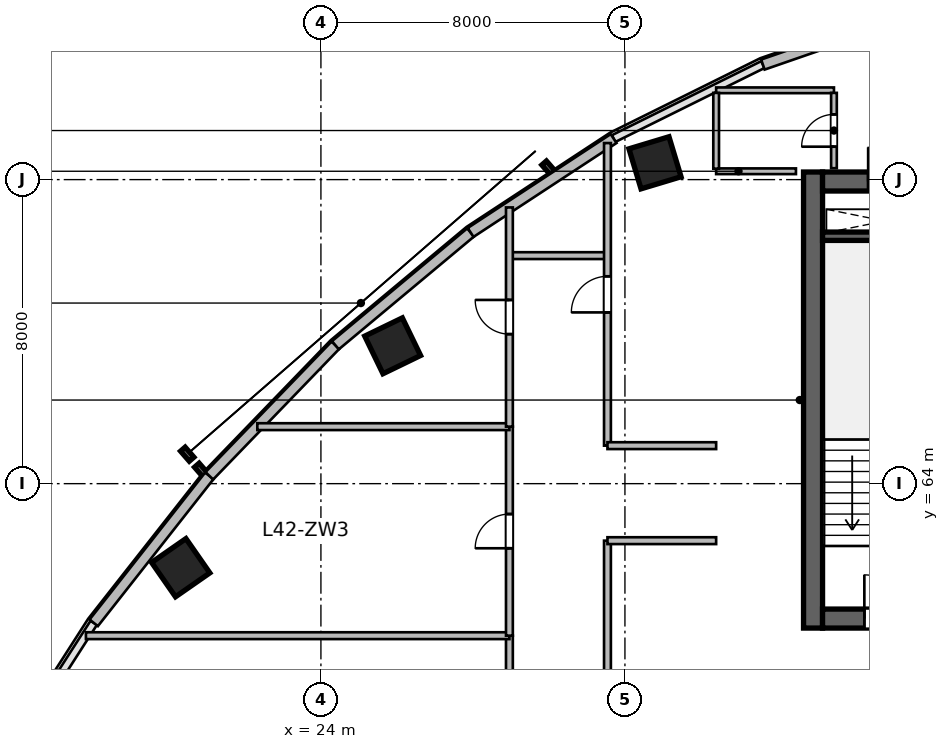
"""IFC4 building model, lengths in metres.
Left out: names, types, materials, properties, quantities, classifications, styles, units other than length and angle.
Written with IfcOpenShell. Run it as: python <this file> out.ifc"""

import sys

from ifc_helpers import new_model, si_unit, direction, frame, frame_2d, origin, origin_2d, place, context, subcontext, project, spatial, rectangle, extrude, source, transform, mapped, element, fill, save


model = new_model("IFC4")
c1 = context("Model", 3, precision=1e-05, world=origin(), true_north=direction((0.0, 1.0)))
c2 = subcontext(c1, "Body", "Model", "MODEL_VIEW")
j1 = project(units=[si_unit("LENGTHUNIT", "METRE"), si_unit("PLANEANGLEUNIT", "RADIAN")], contexts=[c1])
p1 = place(None, origin())
s1 = spatial("IfcSite", under=j1, at=p1, CompositionType="ELEMENT")
p2 = place(p1, origin())
s2 = spatial("IfcBuilding", under=s1, at=p2, CompositionType="ELEMENT")
p3 = place(p2, frame((0.0, 0.0, 174.0)))
s3 = spatial("IfcBuildingStorey", under=s2, at=p3, CompositionType="ELEMENT", Elevation=174.0)
m1 = source(origin(), c2, "Body", "SweptSolid", [
    extrude(rectangle(XDim=12.0, YDim=0.5, at=frame_2d((6.0, 0.0))), origin(), (0.0, 0.0, 1.0), 3.9),
])
p4 = place(p3, frame((36.95, 60.2, 0.0), z_axis=(0.0, 0.0, 1.0), x_axis=(0.0, 1.0, 0.0)))
e1 = element("IfcWall", 1, at=p4, inside=s3, PredefinedType="SHEAR", context=c2, shape_type="MappedRepresentation", body=[
    mapped(m1, transform((0.0, 0.0, 0.0), scale=1.0)),
])
m2 = source(origin(), c2, "Body", "SweptSolid", [
    extrude(rectangle(XDim=21.6, YDim=0.5, at=frame_2d((10.8, 0.0))), origin(), (0.0, 0.0, 1.0), 3.9),
])
p5 = place(p3, frame((37.2, 60.45, 0.0), z_axis=(0.0, 0.0, 1.0), x_axis=(1.0, 0.0, 0.0)))
e2 = element("IfcWall", 2, at=p5, inside=s3, PredefinedType="SHEAR", context=c2, shape_type="MappedRepresentation", body=[
    mapped(m2, transform((0.0, 0.0, 0.0), scale=1.0)),
])
p6 = place(p5, frame((1.1, 0.0, 0.0)))
e3 = element("IfcOpeningElement", 3, at=p6, cuts=e2, PredefinedType="OPENING", context=c2, shape_type="SweptSolid", body=[
    extrude(rectangle(XDim=1.15, YDim=2.15, at=frame_2d((0.575, 1.075))), frame((0.0, 0.26, 0.0), z_axis=(0.0, -1.0, 0.0), x_axis=(1.0, 0.0, 0.0)), (0.0, 0.0, 1.0), 0.52),
])
p7 = place(p5, frame((19.5, 0.0, 0.0)))
e4 = element("IfcOpeningElement", 4, at=p7, cuts=e2, PredefinedType="OPENING", context=c2, shape_type="SweptSolid", body=[
    extrude(rectangle(XDim=0.9, YDim=2.1, at=frame_2d((0.45, 1.05))), frame((0.0, 0.26, 0.0), z_axis=(0.0, -1.0, 0.0), x_axis=(1.0, 0.0, 0.0)), (0.0, 0.0, 1.0), 0.52),
])
p8 = place(p5, frame((12.02, 0.0, 0.0)))
e5 = element("IfcOpeningElement", 5, at=p8, cuts=e2, PredefinedType="OPENING", context=c2, shape_type="SweptSolid", body=[
    extrude(rectangle(XDim=1.6, YDim=2.15, at=frame_2d((0.8, 1.075))), frame((0.0, 0.26, 0.0), z_axis=(0.0, -1.0, 0.0), x_axis=(1.0, 0.0, 0.0)), (0.0, 0.0, 1.0), 0.52),
])
p9 = place(p3, frame((37.2, 71.95, 0.0), z_axis=(0.0, 0.0, 1.0), x_axis=(1.0, 0.0, 0.0)))
e6 = element("IfcWall", 6, at=p9, inside=s3, PredefinedType="SHEAR", context=c2, shape_type="MappedRepresentation", body=[
    mapped(m2, transform((0.0, 0.0, 0.0), scale=1.0)),
])
p10 = place(p9, frame((1.2, 0.0, 0.0)))
e7 = element("IfcOpeningElement", 7, at=p10, cuts=e6, PredefinedType="OPENING", context=c2, shape_type="SweptSolid", body=[
    extrude(rectangle(XDim=0.9, YDim=2.1, at=frame_2d((0.45, 1.05))), frame((0.0, 0.26, 0.0), z_axis=(0.0, -1.0, 0.0), x_axis=(1.0, 0.0, 0.0)), (0.0, 0.0, 1.0), 0.52),
])
p11 = place(p9, frame((14.7, 0.0, 0.0)))
e8 = element("IfcOpeningElement", 8, at=p11, cuts=e6, PredefinedType="OPENING", context=c2, shape_type="SweptSolid", body=[
    extrude(rectangle(XDim=1.2, YDim=2.15, at=frame_2d((0.6, 1.075))), frame((0.0, 0.26, 0.0), z_axis=(0.0, -1.0, 0.0), x_axis=(1.0, 0.0, 0.0)), (0.0, 0.0, 1.0), 0.52),
])
p12 = place(p9, frame((4.15, 0.0, 0.0)))
e9 = element("IfcOpeningElement", 9, at=p12, cuts=e6, PredefinedType="OPENING", context=c2, shape_type="SweptSolid", body=[
    extrude(rectangle(XDim=1.3, YDim=2.15, at=frame_2d((0.65, 1.075))), frame((0.0, 0.26, 0.0), z_axis=(0.0, -1.0, 0.0), x_axis=(1.0, 0.0, 0.0)), (0.0, 0.0, 1.0), 0.52),
])
p13 = place(p9, frame((6.76, 0.0, 0.0)))
e10 = element("IfcOpeningElement", 10, at=p13, cuts=e6, PredefinedType="OPENING", context=c2, shape_type="SweptSolid", body=[
    extrude(rectangle(XDim=0.85, YDim=2.1, at=frame_2d((0.425, 1.05))), frame((0.0, 0.26, 0.0), z_axis=(0.0, -1.0, 0.0), x_axis=(1.0, 0.0, 0.0)), (0.0, 0.0, 1.0), 0.52),
])
p14 = place(p9, frame((8.76, 0.0, 0.0)))
e11 = element("IfcOpeningElement", 11, at=p14, cuts=e6, PredefinedType="OPENING", context=c2, shape_type="SweptSolid", body=[
    extrude(rectangle(XDim=0.85, YDim=2.1, at=frame_2d((0.425, 1.05))), frame((0.0, 0.26, 0.0), z_axis=(0.0, -1.0, 0.0), x_axis=(1.0, 0.0, 0.0)), (0.0, 0.0, 1.0), 0.52),
])
p15 = place(p9, frame((10.725, 0.0, 0.0)))
e12 = element("IfcOpeningElement", 12, at=p15, cuts=e6, PredefinedType="OPENING", context=c2, shape_type="SweptSolid", body=[
    extrude(rectangle(XDim=0.85, YDim=2.1, at=frame_2d((0.425, 1.05))), frame((0.0, 0.26, 0.0), z_axis=(0.0, -1.0, 0.0), x_axis=(1.0, 0.0, 0.0)), (0.0, 0.0, 1.0), 0.52),
])
m3 = source(origin(), c2, "Body", "SweptSolid", [
    extrude(rectangle(XDim=3.27, YDim=0.22, at=frame_2d((1.635, 0.0))), origin(), (0.0, 0.0, 1.0), 3.9),
])
p16 = place(p3, frame((37.2, 70.51, 0.0), z_axis=(0.0, 0.0, 1.0), x_axis=(1.0, 0.0, 0.0)))
e13 = element("IfcWall", 13, at=p16, inside=s3, PredefinedType="SHEAR", context=c2, shape_type="MappedRepresentation", body=[
    mapped(m3, transform((0.0, 0.0, 0.0), scale=1.0)),
])
m4 = source(origin(), c2, "Body", "SweptSolid", [
    extrude(rectangle(XDim=1.1, YDim=1.1, at=origin_2d()), origin(), (0.0, 0.0, 1.0), 3.9),
])
for number, where, z_axis, x_axis in (
    (14, (20.311, 61.789, 0.0), (0.0, 0.0, 1.0), (-0.571, 0.821, 0.0)),
    (15, (25.888, 67.627, 0.0), (0.0, 0.0, 1.0), (-0.436, 0.9, 0.0)),
    (16, (32.791, 72.442, 0.0), (0.0, 0.0, 1.0), (-0.289, 0.957, 0.0)),
):
    element("IfcColumn", number, at=place(p3, frame(where, z_axis=z_axis, x_axis=x_axis)), inside=s3, PredefinedType="COLUMN", context=c2, shape_type="MappedRepresentation", body=[
        mapped(m4, transform((0.0, 0.0, 0.0), scale=1.0)),
    ])
m5 = source(origin(), c2, "Body", "SweptSolid", [
    extrude(rectangle(XDim=4.922, YDim=0.28, at=frame_2d((2.461, 0.0))), origin(), (0.0, 0.0, 1.0), 3.65),
])
p17 = place(p3, frame((18.021, 60.338, 0.0), z_axis=(0.0, 0.0, 1.0), x_axis=(0.61817639101, 0.786039407153, 0.0)))
e17 = element("IfcWall", 17, at=p17, inside=s3, PredefinedType="SOLIDWALL", context=c2, shape_type="MappedRepresentation", body=[
    mapped(m5, transform((0.0, 0.0, 0.0), scale=1.0)),
])
m6 = source(origin(), c2, "Body", "SweptSolid", [
    extrude(rectangle(XDim=4.776, YDim=0.28, at=frame_2d((2.388, 0.0))), origin(), (0.0, 0.0, 1.0), 3.65),
])
p18 = place(p3, frame((21.064, 64.206, 0.0), z_axis=(0.0, 0.0, 1.0), x_axis=(0.694601811851, 0.719394414055, 0.0)))
e18 = element("IfcWall", 18, at=p18, inside=s3, PredefinedType="SOLIDWALL", context=c2, shape_type="MappedRepresentation", body=[
    mapped(m6, transform((0.0, 0.0, 0.0), scale=1.0)),
])
m7 = source(origin(), c2, "Body", "SweptSolid", [
    extrude(rectangle(XDim=4.634, YDim=0.28, at=frame_2d((2.317, 0.0))), origin(), (0.0, 0.0, 1.0), 3.65),
])
p19 = place(p3, frame((24.381, 67.642, 0.0), z_axis=(0.0, 0.0, 1.0), x_axis=(0.767910229096, 0.640557475993, 0.0)))
e19 = element("IfcWall", 19, at=p19, inside=s3, PredefinedType="SOLIDWALL", context=c2, shape_type="MappedRepresentation", body=[
    mapped(m7, transform((0.0, 0.0, 0.0), scale=1.0)),
])
m8 = source(origin(), c2, "Body", "SweptSolid", [
    extrude(rectangle(XDim=4.501, YDim=0.28, at=frame_2d((2.25, 0.0))), origin(), (0.0, 0.0, 1.0), 3.65),
])
p20 = place(p3, frame((27.939, 70.61, 0.0), z_axis=(0.0, 0.0, 1.0), x_axis=(0.835984920737, 0.548752414391, 0.0)))
e20 = element("IfcWall", 20, at=p20, inside=s3, PredefinedType="SOLIDWALL", context=c2, shape_type="MappedRepresentation", body=[
    mapped(m8, transform((0.0, 0.0, 0.0), scale=1.0)),
])
m9 = source(origin(), c2, "Body", "SweptSolid", [
    extrude(rectangle(XDim=4.29, YDim=0.28, at=frame_2d((2.145, 0.0))), origin(), (0.0, 0.0, 1.0), 3.65),
])
p21 = place(p3, frame((35.63, 75.027, 0.0), z_axis=(0.0, 0.0, 1.0), x_axis=(0.944883859218, 0.3274057003, 0.0)))
e21 = element("IfcWall", 21, at=p21, inside=s3, PredefinedType="SOLIDWALL", context=c2, shape_type="MappedRepresentation", body=[
    mapped(m9, transform((0.0, 0.0, 0.0), scale=1.0)),
])
m10 = source(origin(), c2, "Body", "SweptSolid", [
    extrude(rectangle(XDim=2.1, YDim=0.15, at=frame_2d((1.05, 0.0))), origin(), (0.0, 0.0, 1.0), 3.65),
])
p22 = place(p3, frame((34.4, 72.22, 0.0), z_axis=(0.0, 0.0, 1.0), x_axis=(1.0, 0.0, 0.0)))
e22 = element("IfcWall", 22, at=p22, inside=s3, PredefinedType="PARTITIONING", context=c2, shape_type="MappedRepresentation", body=[
    mapped(m10, transform((0.0, 0.0, 0.0), scale=1.0)),
])
m11 = source(origin(), c2, "Body", "SweptSolid", [
    extrude(rectangle(XDim=3.1, YDim=0.15, at=frame_2d((1.55, 0.0))), origin(), (0.0, 0.0, 1.0), 3.022),
])
p23 = place(p3, frame((34.4, 74.35, 0.0), z_axis=(0.0, 0.0, 1.0), x_axis=(1.0, 0.0, 0.0)))
e23 = element("IfcWall", 23, at=p23, inside=s3, PredefinedType="PARTITIONING", context=c2, shape_type="MappedRepresentation", body=[
    mapped(m11, transform((0.0, 0.0, 0.0), scale=1.0)),
])
m12 = source(origin(), c2, "Body", "SweptSolid", [
    extrude(rectangle(XDim=1.995, YDim=0.15, at=frame_2d((0.998, 0.0))), origin(), (0.0, 0.0, 1.0), 3.65),
])
p24 = place(p3, frame((34.4, 72.288, 0.0), z_axis=(0.0, 0.0, 1.0), x_axis=(0.0, 1.0, 0.0)))
e24 = element("IfcWall", 24, at=p24, inside=s3, PredefinedType="PARTITIONING", context=c2, shape_type="MappedRepresentation", body=[
    mapped(m12, transform((0.0, 0.0, 0.0), scale=1.0)),
])
m13 = source(origin(), c2, "Body", "SweptSolid", [
    extrude(rectangle(XDim=1.982, YDim=0.15, at=frame_2d((0.991, 0.0))), origin(), (0.0, 0.0, 1.0), 3.65),
])
p25 = place(p3, frame((37.5, 72.3, 0.0), z_axis=(0.0, 0.0, 1.0), x_axis=(0.0, 1.0, 0.0)))
e25 = element("IfcWall", 25, at=p25, inside=s3, PredefinedType="PARTITIONING", context=c2, shape_type="MappedRepresentation", body=[
    mapped(m13, transform((0.0, 0.0, 0.0), scale=1.0)),
])
p26 = place(p25, frame((0.566, 0.0, 0.0)))
e26 = element("IfcOpeningElement", 26, at=p26, cuts=e25, PredefinedType="OPENING", context=c2, shape_type="SweptSolid", body=[
    extrude(rectangle(XDim=0.85, YDim=2.1, at=frame_2d((0.425, 1.05))), frame((0.0, 0.085, 0.0), z_axis=(0.0, -1.0, 0.0), x_axis=(1.0, 0.0, 0.0)), (0.0, 0.0, 1.0), 0.17),
])
m14 = source(origin(), c2, "Body", "SweptSolid", [
    extrude(rectangle(XDim=2.5, YDim=0.18, at=frame_2d((1.25, 0.0))), origin(), (0.0, 0.0, 1.0), 3.022),
])
p27 = place(p3, frame((29.0, 70.0, 0.0), z_axis=(0.0, 0.0, 1.0), x_axis=(1.0, 0.0, 0.0)))
e27 = element("IfcWall", 27, at=p27, inside=s3, PredefinedType="PLUMBINGWALL", context=c2, shape_type="MappedRepresentation", body=[
    mapped(m14, transform((0.0, 0.0, 0.0), scale=1.0)),
])
m15 = source(origin(), c2, "Body", "SweptSolid", [
    extrude(rectangle(XDim=6.5, YDim=0.18, at=frame_2d((3.25, 0.0))), origin(), (0.0, 0.0, 1.0), 3.081),
])
p28 = place(p3, frame((28.96, 53.5, 0.0), z_axis=(0.0, 0.0, 1.0), x_axis=(0.0, 1.0, 0.0)))
e28 = element("IfcWall", 28, at=p28, inside=s3, PredefinedType="PLUMBINGWALL", context=c2, shape_type="MappedRepresentation", body=[
    mapped(m15, transform((0.0, 0.0, 0.0), scale=1.0)),
])
p29 = place(p28, frame((2.8, 0.0, 0.0)))
e29 = element("IfcOpeningElement", 29, at=p29, cuts=e28, PredefinedType="OPENING", context=c2, shape_type="SweptSolid", body=[
    extrude(rectangle(XDim=0.9, YDim=2.08, at=frame_2d((0.45, 1.04))), frame((0.0, 0.1, 0.0), z_axis=(0.0, -1.0, 0.0), x_axis=(1.0, 0.0, 0.0)), (0.0, 0.0, 1.0), 0.2),
])
m16 = source(origin(), c2, "Body", "SweptSolid", [
    extrude(rectangle(XDim=11.144, YDim=0.18, at=frame_2d((5.572, 0.0))), origin(), (0.0, 0.0, 1.0), 3.65),
])
p30 = place(p3, frame((17.816, 60.0, 0.0), z_axis=(0.0, 0.0, 1.0), x_axis=(1.0, 0.0, 0.0)))
e30 = element("IfcWall", 30, at=p30, inside=s3, PredefinedType="PLUMBINGWALL", context=c2, shape_type="MappedRepresentation", body=[
    mapped(m16, transform((0.0, 0.0, 0.0), scale=1.0)),
])
m17 = source(origin(), c2, "Body", "SweptSolid", [
    extrude(rectangle(XDim=5.5, YDim=0.18, at=frame_2d((2.75, 0.0))), origin(), (0.0, 0.0, 1.0), 2.942),
])
p31 = place(p3, frame((28.96, 60.0, 0.0), z_axis=(0.0, 0.0, 1.0), x_axis=(0.0, 1.0, 0.0)))
e31 = element("IfcWall", 31, at=p31, inside=s3, PredefinedType="PLUMBINGWALL", context=c2, shape_type="MappedRepresentation", body=[
    mapped(m17, transform((0.0, 0.0, 0.0), scale=1.0)),
])
p32 = place(p31, frame((2.3, 0.0, 0.0)))
e32 = element("IfcOpeningElement", 32, at=p32, cuts=e31, PredefinedType="OPENING", context=c2, shape_type="SweptSolid", body=[
    extrude(rectangle(XDim=0.9, YDim=2.08, at=frame_2d((0.45, 1.04))), frame((0.0, 0.1, 0.0), z_axis=(0.0, -1.0, 0.0), x_axis=(1.0, 0.0, 0.0)), (0.0, 0.0, 1.0), 0.2),
])
m18 = source(origin(), c2, "Body", "SweptSolid", [
    extrude(rectangle(XDim=6.633, YDim=0.18, at=frame_2d((3.317, 0.0))), origin(), (0.0, 0.0, 1.0), 3.65),
])
p33 = place(p3, frame((22.327, 65.5, 0.0), z_axis=(0.0, 0.0, 1.0), x_axis=(1.0, 0.0, 0.0)))
e33 = element("IfcWall", 33, at=p33, inside=s3, PredefinedType="PLUMBINGWALL", context=c2, shape_type="MappedRepresentation", body=[
    mapped(m18, transform((0.0, 0.0, 0.0), scale=1.0)),
])
m19 = source(origin(), c2, "Body", "SweptSolid", [
    extrude(rectangle(XDim=5.768, YDim=0.18, at=frame_2d((2.884, 0.0))), origin(), (0.0, 0.0, 1.0), 3.65),
])
p34 = place(p3, frame((28.96, 65.5, 0.0), z_axis=(0.0, 0.0, 1.0), x_axis=(0.0, 1.0, 0.0)))
e34 = element("IfcWall", 34, at=p34, inside=s3, PredefinedType="PLUMBINGWALL", context=c2, shape_type="MappedRepresentation", body=[
    mapped(m19, transform((0.0, 0.0, 0.0), scale=1.0)),
])
p35 = place(p34, frame((2.434, 0.0, 0.0)))
e35 = element("IfcOpeningElement", 35, at=p35, cuts=e34, PredefinedType="OPENING", context=c2, shape_type="SweptSolid", body=[
    extrude(rectangle(XDim=0.9, YDim=2.08, at=frame_2d((0.45, 1.04))), frame((0.0, 0.1, 0.0), z_axis=(0.0, -1.0, 0.0), x_axis=(1.0, 0.0, 0.0)), (0.0, 0.0, 1.0), 0.2),
])
m20 = source(origin(), c2, "Body", "SweptSolid", [
    extrude(rectangle(XDim=16.106, YDim=0.18, at=frame_2d((8.053, 0.0))), origin(), (0.0, 0.0, 1.0), 2.942),
])
p36 = place(p3, frame((31.54, 46.394, 0.0), z_axis=(0.0, 0.0, 1.0), x_axis=(0.0, 1.0, 0.0)))
e36 = element("IfcWall", 36, at=p36, inside=s3, PredefinedType="PLUMBINGWALL", context=c2, shape_type="MappedRepresentation", body=[
    mapped(m20, transform((0.0, 0.0, 0.0), scale=1.0)),
])
p37 = place(p36, frame((7.578, 0.0, 0.0)))
e37 = element("IfcOpeningElement", 37, at=p37, cuts=e36, PredefinedType="OPENING", context=c2, shape_type="SweptSolid", body=[
    extrude(rectangle(XDim=0.95, YDim=2.1, at=frame_2d((0.475, 1.05))), frame((0.0, 0.1, 0.0), z_axis=(0.0, -1.0, 0.0), x_axis=(1.0, 0.0, 0.0)), (0.0, 0.0, 1.0), 0.2),
])
m21 = source(origin(), c2, "Body", "SweptSolid", [
    extrude(rectangle(XDim=2.86, YDim=0.18, at=frame_2d((1.43, 0.0))), origin(), (0.0, 0.0, 1.0), 3.65),
])
p38 = place(p3, frame((31.54, 62.5, 0.0), z_axis=(0.0, 0.0, 1.0), x_axis=(1.0, 0.0, 0.0)))
e38 = element("IfcWall", 38, at=p38, inside=s3, PredefinedType="PLUMBINGWALL", context=c2, shape_type="MappedRepresentation", body=[
    mapped(m21, transform((0.0, 0.0, 0.0), scale=1.0)),
])
m22 = source(origin(), c2, "Body", "SweptSolid", [
    extrude(rectangle(XDim=7.962, YDim=0.18, at=frame_2d((3.981, 0.0))), origin(), (0.0, 0.0, 1.0), 3.65),
])
p39 = place(p3, frame((31.54, 65.0, 0.0), z_axis=(0.0, 0.0, 1.0), x_axis=(0.0, 1.0, 0.0)))
e39 = element("IfcWall", 39, at=p39, inside=s3, PredefinedType="PLUMBINGWALL", context=c2, shape_type="MappedRepresentation", body=[
    mapped(m22, transform((0.0, 0.0, 0.0), scale=1.0)),
])
p40 = place(p39, frame((3.506, 0.0, 0.0)))
e40 = element("IfcOpeningElement", 40, at=p40, cuts=e39, PredefinedType="OPENING", context=c2, shape_type="SweptSolid", body=[
    extrude(rectangle(XDim=0.95, YDim=2.1, at=frame_2d((0.475, 1.05))), frame((0.0, 0.1, 0.0), z_axis=(0.0, -1.0, 0.0), x_axis=(1.0, 0.0, 0.0)), (0.0, 0.0, 1.0), 0.2),
])
p41 = place(p3, frame((31.54, 65.0, 0.0), z_axis=(0.0, 0.0, 1.0), x_axis=(1.0, 0.0, 0.0)))
e41 = element("IfcWall", 41, at=p41, inside=s3, PredefinedType="PLUMBINGWALL", context=c2, shape_type="MappedRepresentation", body=[
    mapped(m21, transform((0.0, 0.0, 0.0), scale=1.0)),
])
m23 = source(origin(), c2, "Body", "SweptSolid", [
    extrude(rectangle(XDim=1.15, YDim=2.15, at=frame_2d((0.575, 1.075))), frame((0.0, 0.025, 0.0), z_axis=(0.0, -1.0, 0.0), x_axis=(1.0, 0.0, 0.0)), (0.0, 0.0, 1.0), 0.05),
])
p42 = place(p6, origin())
e42 = element("IfcDoor", 42, at=p42, inside=s3, OperationType="SINGLE_SWING_LEFT", PredefinedType="DOOR", context=c2, shape_type="MappedRepresentation", body=[
    mapped(m23, transform((0.0, 0.0, 0.0), scale=1.0)),
])
fill(e3, e42)
m24 = source(origin(), c2, "Body", "SweptSolid", [
    extrude(rectangle(XDim=0.9, YDim=2.1, at=frame_2d((0.45, 1.05))), frame((0.0, 0.025, 0.0), z_axis=(0.0, -1.0, 0.0), x_axis=(1.0, 0.0, 0.0)), (0.0, 0.0, 1.0), 0.05),
])
p43 = place(p10, origin())
e43 = element("IfcDoor", 43, at=p43, inside=s3, OperationType="SINGLE_SWING_LEFT", PredefinedType="DOOR", context=c2, shape_type="MappedRepresentation", body=[
    mapped(m24, transform((0.0, 0.0, 0.0), scale=1.0)),
])
fill(e7, e43)
m25 = source(origin(), c2, "Body", "SweptSolid", [
    extrude(rectangle(XDim=0.85, YDim=2.1, at=frame_2d((0.425, 1.05))), frame((0.0, 0.025, 0.0), z_axis=(0.0, -1.0, 0.0), x_axis=(1.0, 0.0, 0.0)), (0.0, 0.0, 1.0), 0.05),
])
p44 = place(p26, origin())
e44 = element("IfcDoor", 44, at=p44, inside=s3, OperationType="SINGLE_SWING_LEFT", PredefinedType="DOOR", context=c2, shape_type="MappedRepresentation", body=[
    mapped(m25, transform((0.0, 0.0, 0.0), scale=1.0)),
])
fill(e26, e44)
m26 = source(origin(), c2, "Body", "SweptSolid", [
    extrude(rectangle(XDim=0.9, YDim=2.08, at=frame_2d((0.45, 1.04))), frame((0.0, 0.025, 0.0), z_axis=(0.0, -1.0, 0.0), x_axis=(1.0, 0.0, 0.0)), (0.0, 0.0, 1.0), 0.05),
])
p45 = place(p32, origin())
e45 = element("IfcDoor", 45, at=p45, inside=s3, OperationType="SINGLE_SWING_LEFT", PredefinedType="DOOR", context=c2, shape_type="MappedRepresentation", body=[
    mapped(m26, transform((0.0, 0.0, 0.0), scale=1.0)),
])
fill(e32, e45)
p46 = place(p35, origin())
e46 = element("IfcDoor", 46, at=p46, inside=s3, OperationType="SINGLE_SWING_RIGHT", PredefinedType="DOOR", context=c2, shape_type="MappedRepresentation", body=[
    mapped(m26, transform((0.0, 0.0, 0.0), scale=1.0)),
])
fill(e35, e46)
m27 = source(origin(), c2, "Body", "SweptSolid", [
    extrude(rectangle(XDim=0.95, YDim=2.1, at=frame_2d((0.475, 1.05))), frame((0.0, 0.025, 0.0), z_axis=(0.0, -1.0, 0.0), x_axis=(1.0, 0.0, 0.0)), (0.0, 0.0, 1.0), 0.05),
])
p47 = place(p40, origin())
e47 = element("IfcDoor", 47, at=p47, inside=s3, OperationType="SINGLE_SWING_LEFT", PredefinedType="DOOR", context=c2, shape_type="MappedRepresentation", body=[
    mapped(m27, transform((0.0, 0.0, 0.0), scale=1.0)),
])
fill(e40, e47)
save(model, sys.argv[1])
